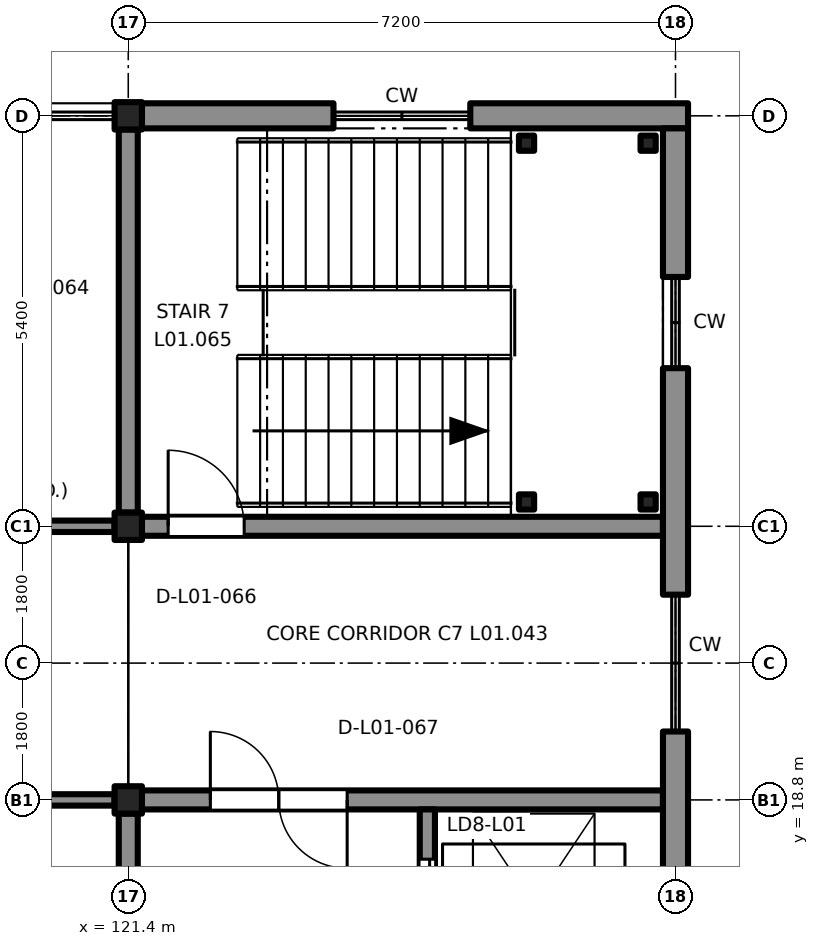
"""IFC4 building model, lengths in metres.
Left out: names, types, materials, properties, quantities, classifications, styles, units other than length and angle.
Written with IfcOpenShell. Run it as: python <this file> out.ifc"""

import sys

from ifc_helpers import new_model, si_unit, direction, frame, frame_2d, origin, origin_2d, place, context, subcontext, project, spatial, rectangle, extrude, element, fill, save


model = new_model("IFC4")
c1 = context("Model", 3, precision=1e-05, world=origin(), true_north=direction((0.0, 1.0)))
c2 = subcontext(c1, "Body", "Model", "MODEL_VIEW")
j1 = project(units=[si_unit("LENGTHUNIT", "METRE"), si_unit("PLANEANGLEUNIT", "RADIAN")], contexts=[c1])
p1 = place(None, origin())
s1 = spatial("IfcSite", under=j1, at=p1, CompositionType="ELEMENT")
p2 = place(p1, origin())
s2 = spatial("IfcBuilding", under=s1, at=p2, CompositionType="ELEMENT")
p3 = place(p2, frame((0.0, 0.0, 6.3)))
s3 = spatial("IfcBuildingStorey", under=s2, at=p3, CompositionType="ELEMENT", Elevation=6.3)
for number, where, z_axis, x_axis in (
    (1, (121.4, 18.8, 0.0), (0.0, 0.0, 1.0), (1.0, 0.0, 0.0)),
    (2, (121.4, 22.4, 0.0), (0.0, 0.0, 1.0), (1.0, 0.0, 0.0)),
    (3, (121.4, 27.8, 0.0), (0.0, 0.0, 1.0), (1.0, 0.0, 0.0)),
):
    element("IfcColumn", number, at=place(p3, frame(where, z_axis=z_axis, x_axis=x_axis)), inside=s3, PredefinedType="COLUMN", context=c2, shape_type="SweptSolid", body=[
        extrude(rectangle(XDim=0.36, YDim=0.36, at=origin_2d()), origin(), (0.0, 0.0, 1.0), 3.9),
    ])
p4 = place(p3, frame((121.58, 22.4, 0.0), z_axis=(0.0, 0.0, 1.0), x_axis=(1.0, 0.0, 0.0)))
e4 = element("IfcWall", 4, at=p4, inside=s3, PredefinedType="SHEAR", context=c2, shape_type="SweptSolid", body=[
    extrude(rectangle(XDim=6.855, YDim=0.25, at=frame_2d((3.427, 0.0))), origin(), (0.0, 0.0, 1.0), 3.65),
])
p5 = place(p4, frame((0.345, 0.0, 0.0)))
e5 = element("IfcOpeningElement", 5, at=p5, cuts=e4, PredefinedType="OPENING", context=c2, shape_type="SweptSolid", body=[
    extrude(rectangle(XDim=1.0, YDim=2.1, at=frame_2d((0.5, 1.05))), frame((0.0, 0.135, 0.0), z_axis=(0.0, -1.0, 0.0), x_axis=(1.0, 0.0, 0.0)), (0.0, 0.0, 1.0), 0.27),
])
p6 = place(p3, frame((121.4, 22.58, 0.0), z_axis=(0.0, 0.0, 1.0), x_axis=(0.0, 1.0, 0.0)))
e6 = element("IfcWall", 6, at=p6, inside=s3, PredefinedType="SHEAR", context=c2, shape_type="SweptSolid", body=[
    extrude(rectangle(XDim=5.04, YDim=0.25, at=frame_2d((2.52, 0.0))), origin(), (0.0, 0.0, 1.0), 3.65),
])
p7 = place(p3, frame((121.58, 18.8, 0.0), z_axis=(0.0, 0.0, 1.0), x_axis=(1.0, 0.0, 0.0)))
e7 = element("IfcWall", 7, at=p7, inside=s3, PredefinedType="SHEAR", context=c2, shape_type="SweptSolid", body=[
    extrude(rectangle(XDim=6.855, YDim=0.25, at=frame_2d((3.427, 0.0))), origin(), (0.0, 0.0, 1.0), 3.65),
])
p8 = place(p7, frame((0.9, 0.0, 0.0)))
e8 = element("IfcOpeningElement", 8, at=p8, cuts=e7, PredefinedType="OPENING", context=c2, shape_type="SweptSolid", body=[
    extrude(rectangle(XDim=1.8, YDim=2.1, at=frame_2d((0.9, 1.05))), frame((0.0, 0.135, 0.0), z_axis=(0.0, -1.0, 0.0), x_axis=(1.0, 0.0, 0.0)), (0.0, 0.0, 1.0), 0.27),
])
p9 = place(p3, frame((121.4, 13.58, 0.0), z_axis=(0.0, 0.0, 1.0), x_axis=(0.0, 1.0, 0.0)))
e9 = element("IfcWall", 9, at=p9, inside=s3, PredefinedType="SHEAR", context=c2, shape_type="SweptSolid", body=[
    extrude(rectangle(XDim=5.04, YDim=0.25, at=frame_2d((2.52, 0.0))), origin(), (0.0, 0.0, 1.0), 3.65),
])
p10 = place(p3, frame((125.335, 13.565, 0.0), z_axis=(0.0, 0.0, 1.0), x_axis=(0.0, 1.0, 0.0)))
e10 = element("IfcWall", 10, at=p10, inside=s3, PredefinedType="SHEAR", context=c2, shape_type="SweptSolid", body=[
    extrude(rectangle(XDim=5.11, YDim=0.2, at=frame_2d((2.555, 0.0))), origin(), (0.0, 0.0, 1.0), 3.65),
])
p11 = place(p10, frame((0.6, 0.0, 0.0)))
e11 = element("IfcOpeningElement", 11, at=p11, cuts=e10, PredefinedType="OPENING", context=c2, shape_type="SweptSolid", body=[
    extrude(rectangle(XDim=1.2, YDim=2.1, at=frame_2d((0.6, 1.05))), frame((0.0, 0.11, 0.0), z_axis=(0.0, -1.0, 0.0), x_axis=(1.0, 0.0, 0.0)), (0.0, 0.0, 1.0), 0.22),
])
p12 = place(p10, frame((3.255, 0.0, 0.0)))
e12 = element("IfcOpeningElement", 12, at=p12, cuts=e10, PredefinedType="OPENING", context=c2, shape_type="SweptSolid", body=[
    extrude(rectangle(XDim=1.2, YDim=2.1, at=frame_2d((0.6, 1.05))), frame((0.0, 0.11, 0.0), z_axis=(0.0, -1.0, 0.0), x_axis=(1.0, 0.0, 0.0)), (0.0, 0.0, 1.0), 0.22),
])
for number, where, z_axis, x_axis in (
    (13, (128.24, 22.72, 0.0), (0.0, 0.0, 1.0), (1.0, 0.0, 0.0)),
    (14, (128.24, 27.44, 0.0), (0.0, 0.0, 1.0), (1.0, 0.0, 0.0)),
    (15, (126.64, 22.72, 0.0), (0.0, 0.0, 1.0), (1.0, 0.0, 0.0)),
    (16, (126.64, 27.44, 0.0), (0.0, 0.0, 1.0), (1.0, 0.0, 0.0)),
):
    element("IfcColumn", number, at=place(p3, frame(where, z_axis=z_axis, x_axis=x_axis)), inside=s3, PredefinedType="COLUMN", context=c2, shape_type="SweptSolid", body=[
        extrude(rectangle(XDim=0.2, YDim=0.2, at=origin_2d()), origin(), (0.0, 0.0, 1.0), 3.9),
    ])
p13 = place(p3, frame((121.58, 27.8, 0.0), z_axis=(0.0, 0.0, 1.0), x_axis=(1.0, 0.0, 0.0)))
e17 = element("IfcWall", 17, at=p13, inside=s3, PredefinedType="SOLIDWALL", context=c2, shape_type="SweptSolid", body=[
    extrude(rectangle(XDim=2.52, YDim=0.33, at=frame_2d((1.26, 0.0))), origin(), (0.0, 0.0, 1.0), 3.22),
])
p14 = place(p3, frame((125.9, 27.8, 0.0), z_axis=(0.0, 0.0, 1.0), x_axis=(1.0, 0.0, 0.0)))
e18 = element("IfcWall", 18, at=p14, inside=s3, PredefinedType="SOLIDWALL", context=c2, shape_type="SweptSolid", body=[
    extrude(rectangle(XDim=2.865, YDim=0.33, at=frame_2d((1.433, 0.0))), origin(), (0.0, 0.0, 1.0), 3.22),
])
p15 = place(p3, frame((128.6, 19.7, 0.0), z_axis=(0.0, 0.0, 1.0), x_axis=(0.0, -1.0, 0.0)))
e19 = element("IfcWall", 19, at=p15, inside=s3, PredefinedType="SOLIDWALL", context=c2, shape_type="SweptSolid", body=[
    extrude(rectangle(XDim=6.135, YDim=0.33, at=frame_2d((3.067, 0.0))), origin(), (0.0, 0.0, 1.0), 3.2),
])
p16 = place(p3, frame((128.6, 24.48, 0.0), z_axis=(0.0, 0.0, 1.0), x_axis=(0.0, -1.0, 0.0)))
e20 = element("IfcWall", 20, at=p16, inside=s3, PredefinedType="SOLIDWALL", context=c2, shape_type="SweptSolid", body=[
    extrude(rectangle(XDim=2.98, YDim=0.33, at=frame_2d((1.49, 0.0))), origin(), (0.0, 0.0, 1.0), 3.2),
])
p17 = place(p3, frame((128.6, 27.635, 0.0), z_axis=(0.0, 0.0, 1.0), x_axis=(0.0, -1.0, 0.0)))
e21 = element("IfcWall", 21, at=p17, inside=s3, PredefinedType="SOLIDWALL", context=c2, shape_type="SweptSolid", body=[
    extrude(rectangle(XDim=1.955, YDim=0.33, at=frame_2d((0.978, 0.0))), origin(), (0.0, 0.0, 1.0), 3.2),
])
p18 = place(p3, frame((117.8, 18.8, 0.0), z_axis=(0.0, 0.0, 1.0), x_axis=(1.0, 0.0, 0.0)))
e22 = element("IfcWall", 22, at=p18, inside=s3, PredefinedType="PARTITIONING", context=c2, shape_type="SweptSolid", body=[
    extrude(rectangle(XDim=3.42, YDim=0.15, at=frame_2d((1.71, 0.0))), origin(), (0.0, 0.0, 1.0), 3.22),
])
p19 = place(p18, frame((1.35, 0.0, 0.0)))
e23 = element("IfcOpeningElement", 23, at=p19, cuts=e22, PredefinedType="OPENING", context=c2, shape_type="SweptSolid", body=[
    extrude(rectangle(XDim=0.9, YDim=2.1, at=frame_2d((0.45, 1.05))), frame((0.0, 0.085, 0.0), z_axis=(0.0, -1.0, 0.0), x_axis=(1.0, 0.0, 0.0)), (0.0, 0.0, 1.0), 0.17),
])
p20 = place(p3, frame((121.22, 22.4, 0.0), z_axis=(0.0, 0.0, 1.0), x_axis=(-1.0, 0.0, 0.0)))
e24 = element("IfcWall", 24, at=p20, inside=s3, PredefinedType="PARTITIONING", context=c2, shape_type="SweptSolid", body=[
    extrude(rectangle(XDim=3.42, YDim=0.15, at=frame_2d((1.71, 0.0))), origin(), (0.0, 0.0, 1.0), 3.22),
])
p21 = place(p20, frame((1.17, 0.0, 0.0)))
e25 = element("IfcOpeningElement", 25, at=p21, cuts=e24, PredefinedType="OPENING", context=c2, shape_type="SweptSolid", body=[
    extrude(rectangle(XDim=0.9, YDim=2.1, at=frame_2d((0.45, 1.05))), frame((0.0, 0.085, 0.0), z_axis=(0.0, -1.0, 0.0), x_axis=(1.0, 0.0, 0.0)), (0.0, 0.0, 1.0), 0.17),
])
p22 = place(p5, origin())
e26 = element("IfcDoor", 26, at=p22, inside=s3, OperationType="SINGLE_SWING_RIGHT", PredefinedType="DOOR", context=c2, shape_type="SweptSolid", body=[
    extrude(rectangle(XDim=1.0, YDim=2.1, at=frame_2d((0.5, 1.05))), frame((0.0, 0.025, 0.0), z_axis=(0.0, -1.0, 0.0), x_axis=(1.0, 0.0, 0.0)), (0.0, 0.0, 1.0), 0.05),
])
fill(e5, e26)
p23 = place(p8, origin())
e27 = element("IfcDoor", 27, at=p23, inside=s3, OperationType="DOUBLE_DOOR_SINGLE_SWING", PredefinedType="DOOR", context=c2, shape_type="SweptSolid", body=[
    extrude(rectangle(XDim=1.8, YDim=2.1, at=frame_2d((0.9, 1.05))), frame((0.0, 0.025, 0.0), z_axis=(0.0, -1.0, 0.0), x_axis=(1.0, 0.0, 0.0)), (0.0, 0.0, 1.0), 0.05),
])
fill(e8, e27)
p24 = place(p12, origin())
e28 = element("IfcDoor", 28, at=p24, inside=s3, OperationType="DOUBLE_DOOR_SLIDING", PredefinedType="DOOR", context=c2, shape_type="SweptSolid", body=[
    extrude(rectangle(XDim=1.2, YDim=2.1, at=frame_2d((0.6, 1.05))), frame((0.0, 0.025, 0.0), z_axis=(0.0, -1.0, 0.0), x_axis=(1.0, 0.0, 0.0)), (0.0, 0.0, 1.0), 0.05),
])
fill(e12, e28)
save(model, sys.argv[1])
